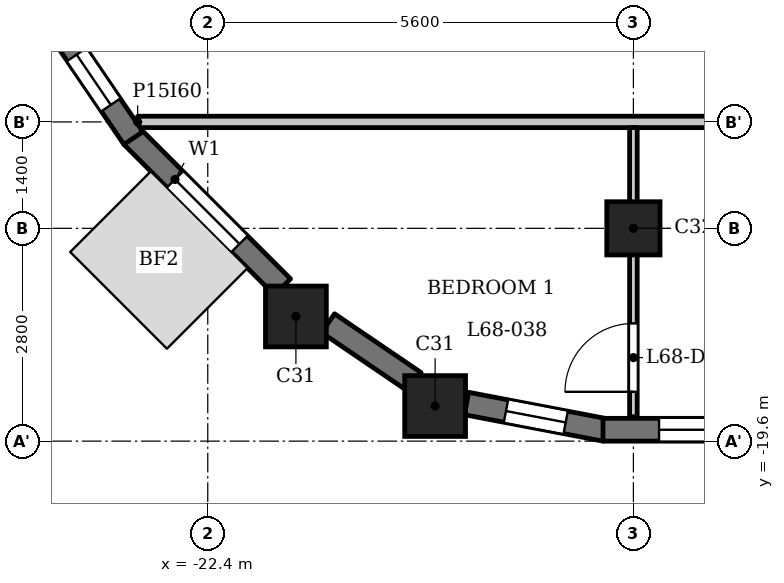
"""IFC4 building model, lengths in metres.
Left out: names, types, materials, properties, quantities, classifications, styles, units other than length and angle.
Written with IfcOpenShell. Run it as: python <this file> out.ifc"""

import sys

from ifc_helpers import new_model, si_unit, direction, frame, frame_2d, origin, origin_2d, place, context, subcontext, project, spatial, rectangle, extrude, element, fill, save


model = new_model("IFC4")
c1 = context("Model", 3, precision=1e-05, world=origin(), true_north=direction((0.0, 1.0)))
c2 = subcontext(c1, "Body", "Model", "MODEL_VIEW")
j1 = project(units=[si_unit("LENGTHUNIT", "METRE"), si_unit("PLANEANGLEUNIT", "RADIAN")], contexts=[c1])
p1 = place(None, origin())
s1 = spatial("IfcSite", under=j1, at=p1, CompositionType="ELEMENT")
p2 = place(p1, origin())
s2 = spatial("IfcBuilding", under=s1, at=p2, CompositionType="ELEMENT")
p3 = place(p2, frame((0.0, 0.0, 262.7)))
s3 = spatial("IfcBuildingStorey", under=s2, at=p3, CompositionType="ELEMENT", Elevation=262.7)
for number, where, z_axis, x_axis in (
    (1, (-19.409, -19.138, 0.0), (0.0, 0.0, 1.0), (1.0, 0.0, 0.0)),
    (2, (-21.24, -17.96, 0.0), (0.0, 0.0, 1.0), (1.0, 0.0, 0.0)),
):
    element("IfcColumn", number, at=place(p3, frame(where, z_axis=z_axis, x_axis=x_axis)), inside=s3, PredefinedType="COLUMN", context=c2, shape_type="SweptSolid", body=[
        extrude(rectangle(XDim=0.8, YDim=0.8, at=origin_2d()), origin(), (0.0, 0.0, 1.0), 3.5),
    ])
p4 = place(p3, frame((-16.8, -16.8, 0.0), z_axis=(0.0, 0.0, 1.0), x_axis=(1.0, 0.0, 0.0)))
e3 = element("IfcColumn", 3, at=p4, inside=s3, PredefinedType="COLUMN", context=c2, shape_type="SweptSolid", body=[
    extrude(rectangle(XDim=0.7, YDim=0.7, at=origin_2d()), origin(), (0.0, 0.0, 1.0), 3.5),
])
p5 = place(p3, frame((-23.397, -15.591, 0.0), z_axis=(0.0, 0.0, 1.0), x_axis=(0.707150377276, -0.707063182409, 0.0)))
e4 = element("IfcWall", 4, at=p5, inside=s3, PredefinedType="SOLIDWALL", context=c2, shape_type="SweptSolid", body=[
    extrude(rectangle(XDim=2.8, YDim=0.3, at=frame_2d((1.4, 0.0))), origin(), (0.0, 0.0, 1.0), 2.55),
])
p6 = place(p5, frame((0.8, 0.0, 0.6)))
e5 = element("IfcOpeningElement", 5, at=p6, cuts=e4, PredefinedType="OPENING", context=c2, shape_type="SweptSolid", body=[
    extrude(rectangle(XDim=1.2, YDim=1.55, at=frame_2d((0.6, 0.775))), frame((0.0, 0.16, 0.0), z_axis=(0.0, -1.0, 0.0), x_axis=(1.0, 0.0, 0.0)), (0.0, 0.0, 1.0), 0.32),
])
p7 = place(p3, frame((-20.817, -18.048, 0.0), z_axis=(0.0, 0.0, 1.0), x_axis=(0.827025410886, -0.562164539747, 0.0)))
e6 = element("IfcWall", 6, at=p7, inside=s3, PredefinedType="SOLIDWALL", context=c2, shape_type="SweptSolid", body=[
    extrude(rectangle(XDim=1.377, YDim=0.3, at=frame_2d((0.688, 0.0))), origin(), (0.0, 0.0, 1.0), 2.55),
])
p8 = place(p3, frame((-18.995, -19.105, 0.0), z_axis=(0.0, 0.0, 1.0), x_axis=(0.982301706131, -0.187305520826, 0.0)))
e7 = element("IfcWall", 7, at=p8, inside=s3, PredefinedType="SOLIDWALL", context=c2, shape_type="SweptSolid", body=[
    extrude(rectangle(XDim=1.856, YDim=0.3, at=frame_2d((0.928, 0.0))), origin(), (0.0, 0.0, 1.0), 2.55),
])
p9 = place(p8, frame((0.528, 0.0, 0.6)))
e8 = element("IfcOpeningElement", 8, at=p9, cuts=e7, PredefinedType="OPENING", context=c2, shape_type="SweptSolid", body=[
    extrude(rectangle(XDim=0.8, YDim=1.55, at=frame_2d((0.4, 0.775))), frame((0.0, 0.16, 0.0), z_axis=(0.0, -1.0, 0.0), x_axis=(1.0, 0.0, 0.0)), (0.0, 0.0, 1.0), 0.32),
])
p10 = place(p3, frame((-17.2, -19.45, 0.0), z_axis=(0.0, 0.0, 1.0), x_axis=(1.0, 0.0, 0.0)))
e9 = element("IfcWall", 9, at=p10, inside=s3, PredefinedType="SOLIDWALL", context=c2, shape_type="SweptSolid", body=[
    extrude(rectangle(XDim=2.8, YDim=0.3, at=frame_2d((1.4, 0.0))), origin(), (0.0, 0.0, 1.0), 2.55),
])
p11 = place(p10, frame((0.738, 0.0, 0.9)))
e10 = element("IfcOpeningElement", 10, at=p11, cuts=e9, PredefinedType="OPENING", context=c2, shape_type="SweptSolid", body=[
    extrude(rectangle(XDim=1.8, YDim=1.25, at=frame_2d((0.9, 0.625))), frame((0.0, 0.16, 0.0), z_axis=(0.0, -1.0, 0.0), x_axis=(1.0, 0.0, 0.0)), (0.0, 0.0, 1.0), 0.32),
])
p12 = place(p3, frame((-24.422, -14.078, 0.0), z_axis=(0.0, 0.0, 1.0), x_axis=(0.562054549384, -0.827100165347, 0.0)))
e11 = element("IfcWall", 11, at=p12, inside=s3, PredefinedType="SOLIDWALL", context=c2, shape_type="SweptSolid", body=[
    extrude(rectangle(XDim=1.856, YDim=0.3, at=frame_2d((0.928, 0.0))), origin(), (0.0, 0.0, 1.0), 2.55),
])
p13 = place(p12, frame((0.528, 0.0, 0.6)))
e12 = element("IfcOpeningElement", 12, at=p13, cuts=e11, PredefinedType="OPENING", context=c2, shape_type="SweptSolid", body=[
    extrude(rectangle(XDim=0.8, YDim=1.55, at=frame_2d((0.4, 0.775))), frame((0.0, 0.16, 0.0), z_axis=(0.0, -1.0, 0.0), x_axis=(1.0, 0.0, 0.0)), (0.0, 0.0, 1.0), 0.32),
])
p14 = place(p3, frame((-23.322, -15.4, 0.0), z_axis=(0.0, 0.0, 1.0), x_axis=(1.0, 0.0, 0.0)))
e13 = element("IfcWall", 13, at=p14, inside=s3, PredefinedType="PARTITIONING", context=c2, shape_type="SweptSolid", body=[
    extrude(rectangle(XDim=46.872, YDim=0.15, at=frame_2d((23.436, 0.0))), origin(), (0.0, 0.0, 1.0), 3.2),
])
p15 = place(p14, frame((12.772, 0.0, 0.0)))
e14 = element("IfcOpeningElement", 14, at=p15, cuts=e13, PredefinedType="OPENING", context=c2, shape_type="SweptSolid", body=[
    extrude(rectangle(XDim=1.0, YDim=2.1, at=frame_2d((0.5, 1.05))), frame((0.0, 0.085, 0.0), z_axis=(0.0, -1.0, 0.0), x_axis=(1.0, 0.0, 0.0)), (0.0, 0.0, 1.0), 0.17),
])
p16 = place(p14, frame((29.572, 0.0, 0.0)))
e15 = element("IfcOpeningElement", 15, at=p16, cuts=e13, PredefinedType="OPENING", context=c2, shape_type="SweptSolid", body=[
    extrude(rectangle(XDim=1.0, YDim=2.1, at=frame_2d((0.5, 1.05))), frame((0.0, 0.085, 0.0), z_axis=(0.0, -1.0, 0.0), x_axis=(1.0, 0.0, 0.0)), (0.0, 0.0, 1.0), 0.17),
])
p17 = place(p14, frame((37.572, 0.0, 0.0)))
e16 = element("IfcOpeningElement", 16, at=p17, cuts=e13, PredefinedType="OPENING", context=c2, shape_type="SweptSolid", body=[
    extrude(rectangle(XDim=1.0, YDim=2.1, at=frame_2d((0.5, 1.05))), frame((0.0, 0.085, 0.0), z_axis=(0.0, -1.0, 0.0), x_axis=(1.0, 0.0, 0.0)), (0.0, 0.0, 1.0), 0.17),
])
p18 = place(p3, frame((-16.8, -19.28, 0.0), z_axis=(0.0, 0.0, 1.0), x_axis=(0.0, 1.0, 0.0)))
e17 = element("IfcWall", 17, at=p18, inside=s3, PredefinedType="PARTITIONING", context=c2, shape_type="SweptSolid", body=[
    extrude(rectangle(XDim=3.805, YDim=0.1, at=frame_2d((1.902, 0.0))), origin(), (0.0, 0.0, 1.0), 3.2),
])
p19 = place(p18, frame((0.329, 0.0, 0.0)))
e18 = element("IfcOpeningElement", 18, at=p19, cuts=e17, PredefinedType="OPENING", context=c2, shape_type="SweptSolid", body=[
    extrude(rectangle(XDim=0.9, YDim=2.1, at=frame_2d((0.45, 1.05))), frame((0.0, 0.06, 0.0), z_axis=(0.0, -1.0, 0.0), x_axis=(1.0, 0.0, 0.0)), (0.0, 0.0, 1.0), 0.12),
])
p20 = place(p19, origin())
e19 = element("IfcDoor", 19, at=p20, inside=s3, OperationType="SINGLE_SWING_RIGHT", PredefinedType="DOOR", context=c2, shape_type="SweptSolid", body=[
    extrude(rectangle(XDim=0.9, YDim=2.1, at=frame_2d((0.45, 1.05))), frame((0.0, 0.025, 0.0), z_axis=(0.0, -1.0, 0.0), x_axis=(1.0, 0.0, 0.0)), (0.0, 0.0, 1.0), 0.05),
])
fill(e18, e19)
p21 = place(p6, origin())
e20 = element("IfcWindow", 20, at=p21, inside=s3, PartitioningType="SINGLE_PANEL", PredefinedType="WINDOW", context=c2, shape_type="SweptSolid", body=[
    extrude(rectangle(XDim=1.2, YDim=1.55, at=frame_2d((0.6, 0.775))), frame((0.0, 0.03, 0.0), z_axis=(0.0, -1.0, 0.0), x_axis=(1.0, 0.0, 0.0)), (0.0, 0.0, 1.0), 0.06),
])
fill(e5, e20)
p22 = place(p9, origin())
e21 = element("IfcWindow", 21, at=p22, inside=s3, PartitioningType="SINGLE_PANEL", PredefinedType="WINDOW", context=c2, shape_type="SweptSolid", body=[
    extrude(rectangle(XDim=0.8, YDim=1.55, at=frame_2d((0.4, 0.775))), frame((0.0, 0.03, 0.0), z_axis=(0.0, -1.0, 0.0), x_axis=(1.0, 0.0, 0.0)), (0.0, 0.0, 1.0), 0.06),
])
fill(e8, e21)
p23 = place(p11, origin())
e22 = element("IfcWindow", 22, at=p23, inside=s3, PartitioningType="SINGLE_PANEL", PredefinedType="WINDOW", context=c2, shape_type="SweptSolid", body=[
    extrude(rectangle(XDim=1.8, YDim=1.25, at=frame_2d((0.9, 0.625))), frame((0.0, 0.03, 0.0), z_axis=(0.0, -1.0, 0.0), x_axis=(1.0, 0.0, 0.0)), (0.0, 0.0, 1.0), 0.06),
])
fill(e10, e22)
p24 = place(p13, origin())
e23 = element("IfcWindow", 23, at=p24, inside=s3, PartitioningType="SINGLE_PANEL", PredefinedType="WINDOW", context=c2, shape_type="SweptSolid", body=[
    extrude(rectangle(XDim=0.8, YDim=1.55, at=frame_2d((0.4, 0.775))), frame((0.0, 0.03, 0.0), z_axis=(0.0, -1.0, 0.0), x_axis=(1.0, 0.0, 0.0)), (0.0, 0.0, 1.0), 0.06),
])
fill(e12, e23)
save(model, sys.argv[1])
